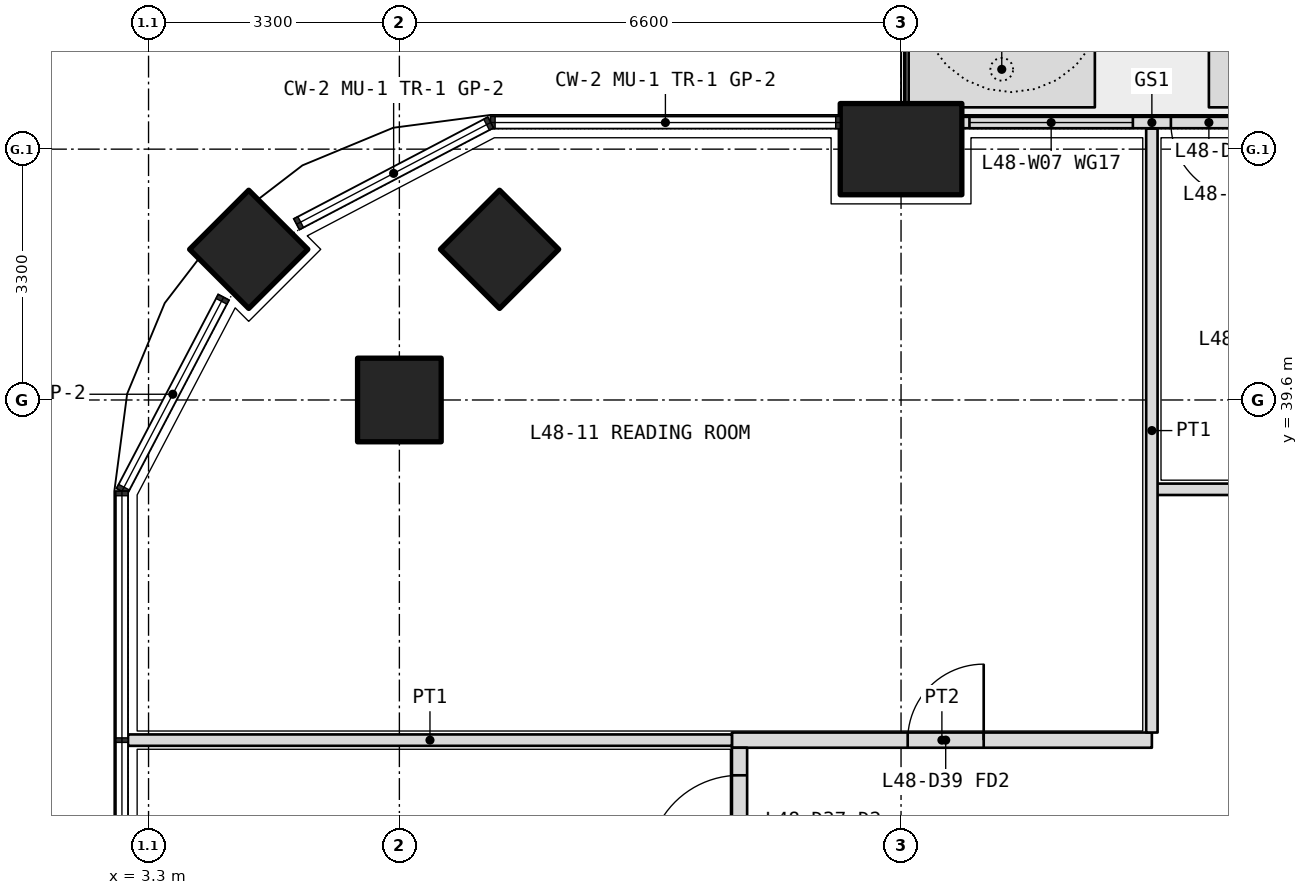
"""IFC4 building model, lengths in metres.
Left out: names, types, materials, properties, quantities, classifications, styles, units other than length and angle.
Written with IfcOpenShell. Run it as: python <this file> out.ifc"""

import sys

from ifc_helpers import new_model, si_unit, direction, frame, frame_2d, origin, origin_2d, place, context, subcontext, project, spatial, polyline, rectangle, outline, extrude, element, fill, save


model = new_model("IFC4")
c1 = context("Model", 3, precision=1e-05, world=origin(), true_north=direction((0.0, 1.0)))
c2 = subcontext(c1, "Body", "Model", "MODEL_VIEW")
j1 = project(units=[si_unit("LENGTHUNIT", "METRE"), si_unit("PLANEANGLEUNIT", "RADIAN")], contexts=[c1])
p1 = place(None, origin())
s1 = spatial("IfcSite", under=j1, at=p1, CompositionType="ELEMENT")
p2 = place(p1, origin())
s2 = spatial("IfcBuilding", under=s1, at=p2, CompositionType="ELEMENT")
p3 = place(p2, frame((0.0, 0.0, 210.3)))
s3 = spatial("IfcBuildingStorey", under=s2, at=p3, CompositionType="ELEMENT", Elevation=210.3)
p4 = place(p3, frame((4.618, 41.582, 0.0), z_axis=(0.0, 0.0, 1.0), x_axis=(0.707106781187, 0.707106781187, 0.0)))
e1 = element("IfcColumn", 1, at=p4, inside=s3, PredefinedType="COLUMN", context=c2, shape_type="SweptSolid", body=[
    extrude(rectangle(XDim=1.1, YDim=1.1, at=origin_2d()), origin(), (0.0, 0.0, 1.0), 4.2),
])
p5 = place(p3, frame((13.2, 42.9, 0.0), z_axis=(0.0, 0.0, 1.0), x_axis=(1.0, 0.0, 0.0)))
e2 = element("IfcColumn", 2, at=p5, inside=s3, PredefinedType="COLUMN", context=c2, shape_type="SweptSolid", body=[
    extrude(rectangle(XDim=1.6, YDim=1.2, at=origin_2d()), origin(), (0.0, 0.0, 1.0), 4.2),
])
for number, where, z_axis, x_axis in (
    (3, (6.6, 39.6, 0.0), (0.0, 0.0, 1.0), (1.0, 0.0, 0.0)),
    (4, (7.918, 41.582, 0.0), (0.0, 0.0, 1.0), (0.707, 0.707, 0.0)),
):
    element("IfcColumn", number, at=place(p3, frame(where, z_axis=z_axis, x_axis=x_axis)), inside=s3, PredefinedType="COLUMN", context=c2, shape_type="SweptSolid", body=[
        extrude(rectangle(XDim=1.1, YDim=1.1, at=origin_2d()), origin(), (0.0, 0.0, 1.0), 4.2),
    ])
p6 = place(p3, origin())
e5 = element("IfcWall", 5, at=p6, inside=s3, PredefinedType="USERDEFINED", context=c2, shape_type="SweptSolid", body=[
    extrude(outline(polyline([(13.3, 43.45), (15.75, 43.45), (15.75, 44.45), (13.3, 44.45), (13.3, 43.45)]), holes=[polyline([(13.45, 43.6), (15.6, 43.6), (15.6, 44.3), (13.45, 44.3), (13.45, 43.6)])]), origin(), (0.0, 0.0, 1.0), 1.05),
])
p7 = place(p3, origin())
e6 = element("IfcWall", 6, at=p7, inside=s3, PredefinedType="USERDEFINED", context=c2, shape_type="SweptSolid", body=[
    extrude(outline(polyline([(17.25, 43.45), (26.3, 43.45), (26.3, 44.45), (17.25, 44.45), (17.25, 43.45)]), holes=[polyline([(17.4, 43.6), (26.15, 43.6), (26.15, 44.3), (17.4, 44.3), (17.4, 43.6)])]), origin(), (0.0, 0.0, 1.0), 1.05),
])
p8 = place(p3, frame((19.0, 43.25, 0.0), z_axis=(0.0, 0.0, 1.0), x_axis=(-1.0, 0.0, 0.0)))
e7 = element("IfcWall", 7, at=p8, inside=s3, PredefinedType="SOLIDWALL", context=c2, shape_type="SweptSolid", body=[
    extrude(rectangle(XDim=5.0, YDim=0.15, at=frame_2d((2.5, 0.0))), origin(), (0.0, 0.0, 1.0), 2.6),
])
p9 = place(p8, frame((1.25, 0.0, 0.0)))
e8 = element("IfcOpeningElement", 8, at=p9, cuts=e7, PredefinedType="OPENING", context=c2, shape_type="SweptSolid", body=[
    extrude(rectangle(XDim=1.0, YDim=2.4, at=frame_2d((0.5, 1.2))), frame((0.0, 0.085, 0.0), z_axis=(0.0, -1.0, 0.0), x_axis=(1.0, 0.0, 0.0)), (0.0, 0.0, 1.0), 0.17),
])
p10 = place(p8, frame((0.1, 0.0, 0.1)))
e9 = element("IfcOpeningElement", 9, at=p10, cuts=e7, PredefinedType="OPENING", context=c2, shape_type="SweptSolid", body=[
    extrude(rectangle(XDim=1.05, YDim=2.2, at=frame_2d((0.525, 1.1))), frame((0.0, 0.085, 0.0), z_axis=(0.0, -1.0, 0.0), x_axis=(1.0, 0.0, 0.0)), (0.0, 0.0, 1.0), 0.17),
])
p11 = place(p8, frame((2.75, 0.0, 0.1)))
e10 = element("IfcOpeningElement", 10, at=p11, cuts=e7, PredefinedType="OPENING", context=c2, shape_type="SweptSolid", body=[
    extrude(rectangle(XDim=2.15, YDim=2.2, at=frame_2d((1.075, 1.1))), frame((0.0, 0.085, 0.0), z_axis=(0.0, -1.0, 0.0), x_axis=(1.0, 0.0, 0.0)), (0.0, 0.0, 1.0), 0.17),
])
p12 = place(p3, frame((10.975, 35.125, 0.0), z_axis=(0.0, 0.0, 1.0), x_axis=(1.0, 0.0, 0.0)))
e11 = element("IfcWall", 11, at=p12, inside=s3, PredefinedType="PARTITIONING", context=c2, shape_type="SweptSolid", body=[
    extrude(rectangle(XDim=5.525, YDim=0.2, at=frame_2d((2.762, 0.0))), origin(), (0.0, 0.0, 1.0), 2.85),
])
p13 = place(p12, frame((2.312, 0.0, 0.0)))
e12 = element("IfcOpeningElement", 12, at=p13, cuts=e11, PredefinedType="OPENING", context=c2, shape_type="SweptSolid", body=[
    extrude(rectangle(XDim=1.0, YDim=2.1, at=frame_2d((0.5, 1.05))), frame((0.0, 0.11, 0.0), z_axis=(0.0, -1.0, 0.0), x_axis=(1.0, 0.0, 0.0)), (0.0, 0.0, 1.0), 0.22),
])
p14 = place(p3, frame((11.075, 11.175, 0.0), z_axis=(0.0, 0.0, 1.0), x_axis=(0.0, 1.0, 0.0)))
e13 = element("IfcWall", 13, at=p14, inside=s3, PredefinedType="PARTITIONING", context=c2, shape_type="SweptSolid", body=[
    extrude(rectangle(XDim=23.85, YDim=0.2, at=frame_2d((11.925, 0.0))), origin(), (0.0, 0.0, 1.0), 2.85),
])
p15 = place(p14, frame((0.462, 0.0, 0.0)))
e14 = element("IfcOpeningElement", 14, at=p15, cuts=e13, PredefinedType="OPENING", context=c2, shape_type="SweptSolid", body=[
    extrude(rectangle(XDim=1.0, YDim=2.1, at=frame_2d((0.5, 1.05))), frame((0.0, 0.11, 0.0), z_axis=(0.0, -1.0, 0.0), x_axis=(1.0, 0.0, 0.0)), (0.0, 0.0, 1.0), 0.22),
])
p16 = place(p14, frame((3.125, 0.0, 0.0)))
e15 = element("IfcOpeningElement", 15, at=p16, cuts=e13, PredefinedType="OPENING", context=c2, shape_type="SweptSolid", body=[
    extrude(rectangle(XDim=1.0, YDim=2.1, at=frame_2d((0.5, 1.05))), frame((0.0, 0.11, 0.0), z_axis=(0.0, -1.0, 0.0), x_axis=(1.0, 0.0, 0.0)), (0.0, 0.0, 1.0), 0.22),
])
p17 = place(p14, frame((6.475, 0.0, 0.0)))
e16 = element("IfcOpeningElement", 16, at=p17, cuts=e13, PredefinedType="OPENING", context=c2, shape_type="SweptSolid", body=[
    extrude(rectangle(XDim=0.9, YDim=2.1, at=frame_2d((0.45, 1.05))), frame((0.0, 0.11, 0.0), z_axis=(0.0, -1.0, 0.0), x_axis=(1.0, 0.0, 0.0)), (0.0, 0.0, 1.0), 0.22),
])
p18 = place(p14, frame((9.675, 0.0, 0.0)))
e17 = element("IfcOpeningElement", 17, at=p18, cuts=e13, PredefinedType="OPENING", context=c2, shape_type="SweptSolid", body=[
    extrude(rectangle(XDim=0.9, YDim=2.1, at=frame_2d((0.45, 1.05))), frame((0.0, 0.11, 0.0), z_axis=(0.0, -1.0, 0.0), x_axis=(1.0, 0.0, 0.0)), (0.0, 0.0, 1.0), 0.22),
])
p19 = place(p14, frame((12.925, 0.0, 0.0)))
e18 = element("IfcOpeningElement", 18, at=p19, cuts=e13, PredefinedType="OPENING", context=c2, shape_type="SweptSolid", body=[
    extrude(rectangle(XDim=1.0, YDim=2.1, at=frame_2d((0.5, 1.05))), frame((0.0, 0.11, 0.0), z_axis=(0.0, -1.0, 0.0), x_axis=(1.0, 0.0, 0.0)), (0.0, 0.0, 1.0), 0.22),
])
p20 = place(p14, frame((16.275, 0.0, 0.0)))
e19 = element("IfcOpeningElement", 19, at=p20, cuts=e13, PredefinedType="OPENING", context=c2, shape_type="SweptSolid", body=[
    extrude(rectangle(XDim=1.2, YDim=2.1, at=frame_2d((0.6, 1.05))), frame((0.0, 0.11, 0.0), z_axis=(0.0, -1.0, 0.0), x_axis=(1.0, 0.0, 0.0)), (0.0, 0.0, 1.0), 0.22),
])
p21 = place(p14, frame((19.575, 0.0, 0.0)))
e20 = element("IfcOpeningElement", 20, at=p21, cuts=e13, PredefinedType="OPENING", context=c2, shape_type="SweptSolid", body=[
    extrude(rectangle(XDim=1.2, YDim=2.1, at=frame_2d((0.6, 1.05))), frame((0.0, 0.11, 0.0), z_axis=(0.0, -1.0, 0.0), x_axis=(1.0, 0.0, 0.0)), (0.0, 0.0, 1.0), 0.22),
])
p22 = place(p14, frame((22.288, 0.0, 0.0)))
e21 = element("IfcOpeningElement", 21, at=p22, cuts=e13, PredefinedType="OPENING", context=c2, shape_type="SweptSolid", body=[
    extrude(rectangle(XDim=1.2, YDim=2.1, at=frame_2d((0.6, 1.05))), frame((0.0, 0.11, 0.0), z_axis=(0.0, -1.0, 0.0), x_axis=(1.0, 0.0, 0.0)), (0.0, 0.0, 1.0), 0.22),
])
p23 = place(p3, frame((3.03, 35.125, 0.0), z_axis=(0.0, 0.0, 1.0), x_axis=(1.0, 0.0, 0.0)))
e22 = element("IfcWall", 22, at=p23, inside=s3, PredefinedType="PARTITIONING", context=c2, shape_type="SweptSolid", body=[
    extrude(rectangle(XDim=7.945, YDim=0.15, at=frame_2d((3.973, 0.0))), origin(), (0.0, 0.0, 1.0), 2.6),
])
p24 = place(p3, frame((16.5, 38.425, 0.0), z_axis=(0.0, 0.0, 1.0), x_axis=(1.0, 0.0, 0.0)))
e23 = element("IfcWall", 23, at=p24, inside=s3, PredefinedType="PARTITIONING", context=c2, shape_type="SweptSolid", body=[
    extrude(rectangle(XDim=6.6, YDim=0.15, at=frame_2d((3.3, 0.0))), origin(), (0.0, 0.0, 1.0), 2.85),
])
p25 = place(p24, frame((2.8, 0.0, 0.0)))
e24 = element("IfcOpeningElement", 24, at=p25, cuts=e23, PredefinedType="OPENING", context=c2, shape_type="SweptSolid", body=[
    extrude(rectangle(XDim=1.0, YDim=2.1, at=frame_2d((0.5, 1.05))), frame((0.0, 0.085, 0.0), z_axis=(0.0, -1.0, 0.0), x_axis=(1.0, 0.0, 0.0)), (0.0, 0.0, 1.0), 0.17),
])
p26 = place(p3, frame((16.5, 43.17, 0.0), z_axis=(0.0, 0.0, 1.0), x_axis=(0.0, -1.0, 0.0)))
e25 = element("IfcWall", 25, at=p26, inside=s3, PredefinedType="PARTITIONING", context=c2, shape_type="SweptSolid", body=[
    extrude(rectangle(XDim=7.945, YDim=0.15, at=frame_2d((3.972, 0.0))), origin(), (0.0, 0.0, 1.0), 2.6),
])
p27 = place(p9, origin())
e26 = element("IfcDoor", 26, at=p27, inside=s3, OperationType="SINGLE_SWING_LEFT", PredefinedType="DOOR", context=c2, shape_type="SweptSolid", body=[
    extrude(rectangle(XDim=1.0, YDim=2.4, at=frame_2d((0.5, 1.2))), frame((0.0, 0.025, 0.0), z_axis=(0.0, -1.0, 0.0), x_axis=(1.0, 0.0, 0.0)), (0.0, 0.0, 1.0), 0.05),
])
fill(e8, e26)
p28 = place(p11, origin())
e27 = element("IfcWindow", 27, at=p28, inside=s3, PartitioningType="SINGLE_PANEL", PredefinedType="WINDOW", context=c2, shape_type="SweptSolid", body=[
    extrude(rectangle(XDim=2.15, YDim=2.2, at=frame_2d((1.075, 1.1))), frame((0.0, 0.03, 0.0), z_axis=(0.0, -1.0, 0.0), x_axis=(1.0, 0.0, 0.0)), (0.0, 0.0, 1.0), 0.06),
])
fill(e10, e27)
p29 = place(p13, origin())
e28 = element("IfcDoor", 28, at=p29, inside=s3, OperationType="SINGLE_SWING_RIGHT", PredefinedType="DOOR", context=c2, shape_type="SweptSolid", body=[
    extrude(rectangle(XDim=1.0, YDim=2.1, at=frame_2d((0.5, 1.05))), frame((0.0, 0.025, 0.0), z_axis=(0.0, -1.0, 0.0), x_axis=(1.0, 0.0, 0.0)), (0.0, 0.0, 1.0), 0.05),
])
fill(e12, e28)
p30 = place(p22, origin())
e29 = element("IfcDoor", 29, at=p30, inside=s3, OperationType="DOUBLE_DOOR_SINGLE_SWING", PredefinedType="DOOR", context=c2, shape_type="SweptSolid", body=[
    extrude(rectangle(XDim=1.2, YDim=2.1, at=frame_2d((0.6, 1.05))), frame((0.0, 0.025, 0.0), z_axis=(0.0, -1.0, 0.0), x_axis=(1.0, 0.0, 0.0)), (0.0, 0.0, 1.0), 0.05),
])
fill(e21, e29)
save(model, sys.argv[1])
